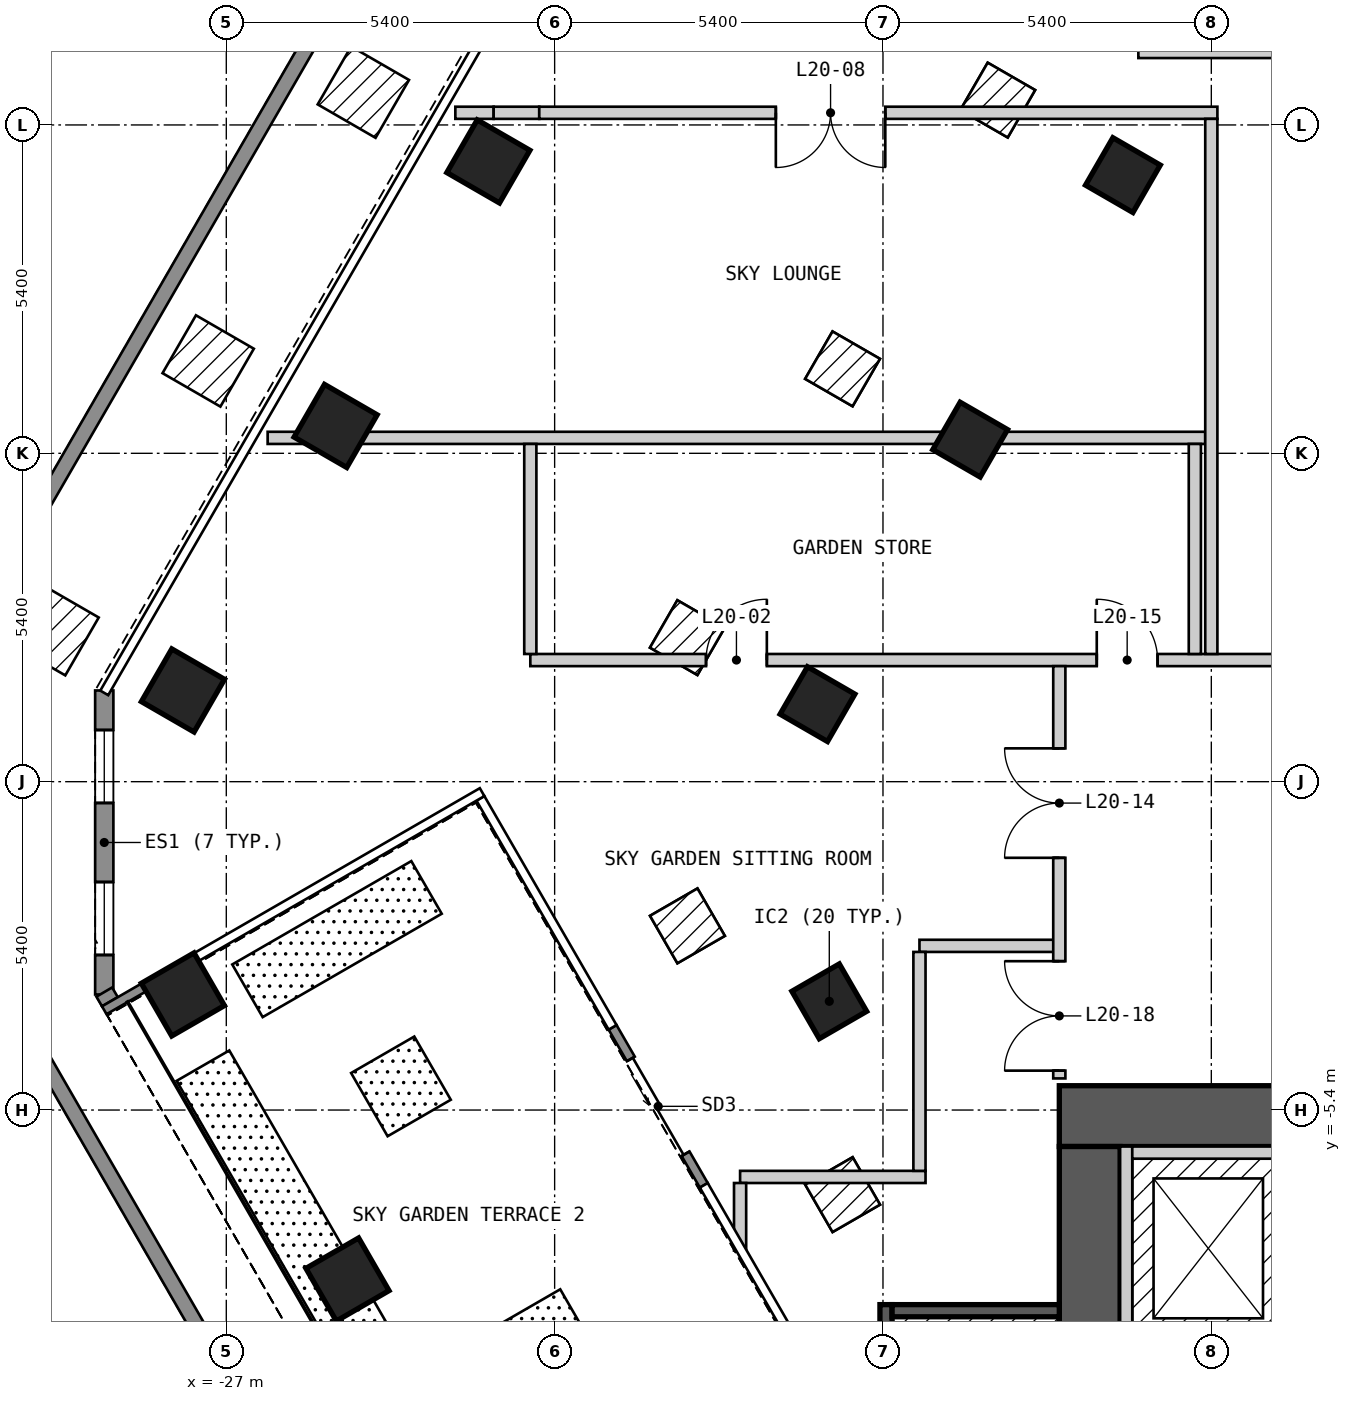
"""IFC4 building model, lengths in metres.
Left out: names, types, materials, properties, quantities, classifications, styles, units other than length and angle.
Written with IfcOpenShell. Run it as: python <this file> out.ifc"""

import sys

from ifc_helpers import new_model, si_unit, direction, frame, frame_2d, origin, origin_2d, place, context, subcontext, project, spatial, polyline, rectangle, outline, extrude, element, fill, save


model = new_model("IFC4")
c1 = context("Model", 3, precision=1e-05, world=origin(), true_north=direction((0.0, 1.0)))
c2 = subcontext(c1, "Body", "Model", "MODEL_VIEW")
j1 = project(units=[si_unit("LENGTHUNIT", "METRE"), si_unit("PLANEANGLEUNIT", "RADIAN")], contexts=[c1])
p1 = place(None, origin())
s1 = spatial("IfcSite", under=j1, at=p1, CompositionType="ELEMENT")
p2 = place(p1, origin())
s2 = spatial("IfcBuilding", under=s1, at=p2, CompositionType="ELEMENT")
p3 = place(p2, frame((0.0, 0.0, 66.0)))
s3 = spatial("IfcBuildingStorey", under=s2, at=p3, CompositionType="ELEMENT", Elevation=66.0)
for number, where, z_axis, x_axis in (
    (1, (-22.69, 10.2, 0.0), (0.0, 0.0, 1.0), (-0.5, -0.866, 0.0)),
    (2, (-25.202, 5.85, 0.0), (0.0, 0.0, 1.0), (-0.5, -0.866, 0.0)),
    (3, (-27.713, 1.5, 0.0), (0.0, 0.0, 1.0), (-0.5, -0.866, 0.0)),
    (4, (-27.714, -3.499, 0.0), (0.0, 0.0, 1.0), (0.5, -0.866, 0.0)),
    (5, (-25.007, -8.187, 0.0), (0.0, 0.0, 1.0), (0.5, -0.866, 0.0)),
):
    element("IfcColumn", number, at=place(p3, frame(where, z_axis=z_axis, x_axis=x_axis)), inside=s3, PredefinedType="COLUMN", context=c2, shape_type="SweptSolid", body=[
        extrude(rectangle(XDim=1.0, YDim=1.0, at=origin_2d()), origin(), (0.0, 0.0, 1.0), 6.0),
    ])
for number, where, z_axis, x_axis in (
    (6, (-17.083, -3.612, 0.0), (0.0, 0.0, 1.0), (0.5, -0.866, 0.0)),
    (7, (-12.254, 9.975, 0.0), (0.0, 0.0, 1.0), (-0.5, -0.866, 0.0)),
    (8, (-14.766, 5.625, 0.0), (0.0, 0.0, 1.0), (-0.5, -0.866, 0.0)),
    (9, (-17.277, 1.275, 0.0), (0.0, 0.0, 1.0), (-0.5, -0.866, 0.0)),
):
    element("IfcColumn", number, at=place(p3, frame(where, z_axis=z_axis, x_axis=x_axis)), inside=s3, PredefinedType="COLUMN", context=c2, shape_type="SweptSolid", body=[
        extrude(rectangle(XDim=0.9, YDim=0.9, at=origin_2d()), origin(), (0.0, 0.0, 1.0), 6.0),
    ])
p4 = place(p3, frame((-13.3, -5.5, 0.0), z_axis=(0.0, 0.0, 1.0), x_axis=(1.0, 0.0, 0.0)))
e10 = element("IfcWall", 10, at=p4, inside=s3, PredefinedType="SHEAR", context=c2, shape_type="SweptSolid", body=[
    extrude(rectangle(XDim=26.6, YDim=1.0, at=frame_2d((13.3, 0.0))), origin(), (0.0, 0.0, 1.0), 5.7),
])
p5 = place(p4, frame((23.65, 0.0, 0.0)))
e11 = element("IfcOpeningElement", 11, at=p5, cuts=e10, PredefinedType="OPENING", context=c2, shape_type="SweptSolid", body=[
    extrude(rectangle(XDim=1.2, YDim=2.1, at=frame_2d((0.6, 1.05))), frame((0.0, 0.51, 0.0), z_axis=(0.0, -1.0, 0.0), x_axis=(1.0, 0.0, 0.0)), (0.0, 0.0, 1.0), 1.02),
])
p6 = place(p3, frame((-12.8, -18.0, 0.0), z_axis=(0.0, 0.0, 1.0), x_axis=(0.0, 1.0, 0.0)))
e12 = element("IfcWall", 12, at=p6, inside=s3, PredefinedType="SHEAR", context=c2, shape_type="SweptSolid", body=[
    extrude(rectangle(XDim=12.0, YDim=1.0, at=frame_2d((6.0, 0.0))), origin(), (0.0, 0.0, 1.0), 5.7),
])
p7 = place(p6, frame((3.8, 0.0, 0.0)))
e13 = element("IfcOpeningElement", 13, at=p7, cuts=e12, PredefinedType="OPENING", context=c2, shape_type="SweptSolid", body=[
    extrude(rectangle(XDim=1.2, YDim=2.1, at=frame_2d((0.6, 1.05))), frame((0.0, 0.51, 0.0), z_axis=(0.0, -1.0, 0.0), x_axis=(1.0, 0.0, 0.0)), (0.0, 0.0, 1.0), 1.02),
])
p8 = place(p3, frame((-29.007, 1.5, 0.0), z_axis=(0.0, 0.0, 1.0), x_axis=(0.0, -1.0, 0.0)))
e14 = element("IfcWall", 14, at=p8, inside=s3, PredefinedType="SOLIDWALL", context=c2, shape_type="SweptSolid", body=[
    extrude(outline(polyline([(0.0, -0.15), (5.0, -0.15), (4.92, 0.15), (0.08, 0.15), (0.0, -0.15)])), origin(), (0.0, 0.0, 1.0), 5.7),
])
p9 = place(p8, frame((0.65, 0.0, 0.15)))
e15 = element("IfcOpeningElement", 15, at=p9, cuts=e14, PredefinedType="OPENING", context=c2, shape_type="SweptSolid", body=[
    extrude(rectangle(XDim=1.2, YDim=2.1, at=frame_2d((0.6, 1.05))), frame((0.0, 0.16, 0.0), z_axis=(0.0, -1.0, 0.0), x_axis=(1.0, 0.0, 0.0)), (0.0, 0.0, 1.0), 0.32),
])
p10 = place(p8, frame((3.15, 0.0, 0.15)))
e16 = element("IfcOpeningElement", 16, at=p10, cuts=e14, PredefinedType="OPENING", context=c2, shape_type="SweptSolid", body=[
    extrude(rectangle(XDim=1.2, YDim=2.1, at=frame_2d((0.6, 1.05))), frame((0.0, 0.16, 0.0), z_axis=(0.0, -1.0, 0.0), x_axis=(1.0, 0.0, 0.0)), (0.0, 0.0, 1.0), 0.32),
])
p11 = place(p3, frame((-29.007, -3.46, 0.0), z_axis=(0.0, 0.0, 1.0), x_axis=(0.505106950785, -0.863056758428, 0.0)))
e17 = element("IfcWall", 17, at=p11, inside=s3, PredefinedType="SOLIDWALL", context=c2, shape_type="SweptSolid", body=[
    extrude(rectangle(XDim=0.184, YDim=0.3, at=frame_2d((0.092, 0.0))), origin(), (0.0, 0.0, 1.0), 5.7),
])
p12 = place(p3, frame((-20.647, -4.04, 0.0), z_axis=(0.0, 0.0, 1.0), x_axis=(0.50002537861, -0.866010750942, 0.0)))
e18 = element("IfcWall", 18, at=p12, inside=s3, PredefinedType="SOLIDWALL", context=c2, shape_type="SweptSolid", body=[
    extrude(rectangle(XDim=3.0, YDim=0.15, at=frame_2d((1.5, 0.0))), origin(), (0.0, 0.0, 1.0), 5.7),
])
p13 = place(p12, frame((0.6, 0.0, 0.0)))
e19 = element("IfcOpeningElement", 19, at=p13, cuts=e18, PredefinedType="OPENING", context=c2, shape_type="SweptSolid", body=[
    extrude(rectangle(XDim=1.8, YDim=2.4, at=frame_2d((0.9, 1.2))), frame((0.0, 0.085, 0.0), z_axis=(0.0, -1.0, 0.0), x_axis=(1.0, 0.0, 0.0)), (0.0, 0.0, 1.0), 0.17),
])
p14 = place(p3, frame((-29.007, -3.759, 0.0), z_axis=(0.0, 0.0, 1.0), x_axis=(0.866218334262, 0.499665685623, 0.0)))
e20 = element("IfcWall", 20, at=p14, inside=s3, PredefinedType="SOLIDWALL", context=c2, shape_type="SweptSolid", body=[
    extrude(rectangle(XDim=0.745, YDim=0.15, at=frame_2d((0.372, 0.0))), origin(), (0.0, 0.0, 1.0), 5.7),
])
for number, where, z_axis, x_axis in (
    (21, (-17.731, -25.837, 0.0), (0.0, 0.0, 1.0), (-0.5, 0.866, 0.0)),
    (22, (-31.242, 2.438, 0.0), (0.0, 0.0, 1.0), (0.5, 0.866, 0.0)),
):
    element("IfcWall", number, at=place(p3, frame(where, z_axis=z_axis, x_axis=x_axis)), inside=s3, PredefinedType="PARAPET", context=c2, shape_type="SweptSolid", body=[
        extrude(outline(polyline([(0.067, -0.125), (26.953, -0.125), (27.02, 0.125), (0.0, 0.125), (0.067, -0.125)])), origin(), (0.0, 0.0, 1.0), 1.6),
    ])
p15 = place(p3, frame((-18.55, -6.5, 0.0), z_axis=(0.0, 0.0, 1.0), x_axis=(1.0, 0.0, 0.0)))
e23 = element("IfcWall", 23, at=p15, inside=s3, PredefinedType="PARTITIONING", context=c2, shape_type="SweptSolid", body=[
    extrude(rectangle(XDim=3.05, YDim=0.2, at=frame_2d((1.525, 0.0))), origin(), (0.0, 0.0, 1.0), 5.7),
])
p16 = place(p3, frame((-15.6, -2.7, 0.0), z_axis=(0.0, 0.0, 1.0), x_axis=(1.0, 0.0, 0.0)))
e24 = element("IfcWall", 24, at=p16, inside=s3, PredefinedType="PARTITIONING", context=c2, shape_type="SweptSolid", body=[
    extrude(rectangle(XDim=2.3, YDim=0.2, at=frame_2d((1.15, 0.0))), origin(), (0.0, 0.0, 1.0), 5.7),
])
p17 = place(p3, frame((-22.0, 2.0, 0.0), z_axis=(0.0, 0.0, 1.0), x_axis=(1.0, 0.0, 0.0)))
e25 = element("IfcWall", 25, at=p17, inside=s3, PredefinedType="PARTITIONING", context=c2, shape_type="SweptSolid", body=[
    extrude(rectangle(XDim=35.4, YDim=0.2, at=frame_2d((17.7, 0.0))), origin(), (0.0, 0.0, 1.0), 5.7),
])
p18 = place(p17, frame((3.89, 0.0, 0.0), z_axis=(0.0, 0.0, 1.0), x_axis=(-1.0, 0.0, 0.0)))
e26 = element("IfcOpeningElement", 26, at=p18, cuts=e25, PredefinedType="OPENING", context=c2, shape_type="SweptSolid", body=[
    extrude(rectangle(XDim=1.0, YDim=2.1, at=frame_2d((0.5, 1.05))), frame((0.0, 0.11, 0.0), z_axis=(0.0, -1.0, 0.0), x_axis=(1.0, 0.0, 0.0)), (0.0, 0.0, 1.0), 0.22),
])
p19 = place(p17, frame((21.1, 0.0, 0.0)))
e27 = element("IfcOpeningElement", 27, at=p19, cuts=e25, PredefinedType="OPENING", context=c2, shape_type="SweptSolid", body=[
    extrude(rectangle(XDim=1.8, YDim=2.1, at=frame_2d((0.9, 1.05))), frame((0.0, 0.11, 0.0), z_axis=(0.0, -1.0, 0.0), x_axis=(1.0, 0.0, 0.0)), (0.0, 0.0, 1.0), 0.22),
])
p20 = place(p17, frame((9.316, 0.0, 0.0)))
e28 = element("IfcOpeningElement", 28, at=p20, cuts=e25, PredefinedType="OPENING", context=c2, shape_type="SweptSolid", body=[
    extrude(rectangle(XDim=1.0, YDim=2.1, at=frame_2d((0.5, 1.05))), frame((0.0, 0.11, 0.0), z_axis=(0.0, -1.0, 0.0), x_axis=(1.0, 0.0, 0.0)), (0.0, 0.0, 1.0), 0.22),
])
p21 = place(p17, frame((13.102, 0.0, 0.0)))
e29 = element("IfcOpeningElement", 29, at=p21, cuts=e25, PredefinedType="OPENING", context=c2, shape_type="SweptSolid", body=[
    extrude(rectangle(XDim=1.8, YDim=2.1, at=frame_2d((0.9, 1.05))), frame((0.0, 0.11, 0.0), z_axis=(0.0, -1.0, 0.0), x_axis=(1.0, 0.0, 0.0)), (0.0, 0.0, 1.0), 0.22),
])
p22 = place(p3, frame((-26.32, 5.654, 0.0), z_axis=(0.0, 0.0, 1.0), x_axis=(1.0, 0.0, 0.0)))
e30 = element("IfcWall", 30, at=p22, inside=s3, PredefinedType="PARTITIONING", context=c2, shape_type="SweptSolid", body=[
    extrude(rectangle(XDim=0.63, YDim=0.2, at=frame_2d((0.315, 0.0))), origin(), (0.0, 0.0, 1.0), 5.7),
])
p23 = place(p3, frame((-25.69, 5.654, 0.0), z_axis=(0.0, 0.0, 1.0), x_axis=(1.0, 0.0, 0.0)))
e31 = element("IfcWall", 31, at=p23, inside=s3, PredefinedType="PARTITIONING", context=c2, shape_type="SweptSolid", body=[
    extrude(rectangle(XDim=0.726, YDim=0.2, at=frame_2d((0.363, 0.0))), origin(), (0.0, 0.0, 1.0), 5.02),
])
p24 = place(p3, frame((-24.964, 5.654, 0.0), z_axis=(0.0, 0.0, 1.0), x_axis=(1.0, 0.0, 0.0)))
e32 = element("IfcWall", 32, at=p24, inside=s3, PredefinedType="PARTITIONING", context=c2, shape_type="SweptSolid", body=[
    extrude(rectangle(XDim=14.064, YDim=0.2, at=frame_2d((7.032, 0.0))), origin(), (0.0, 0.0, 1.0), 5.7),
])
p25 = place(p3, frame((-23.233, 11.0, 0.0), z_axis=(0.0, 0.0, 1.0), x_axis=(1.0, 0.0, 0.0)))
e33 = element("IfcWall", 33, at=p25, inside=s3, PredefinedType="PARTITIONING", context=c2, shape_type="SweptSolid", body=[
    extrude(rectangle(XDim=0.63, YDim=0.2, at=frame_2d((0.315, 0.0))), origin(), (0.0, 0.0, 1.0), 5.7),
])
p26 = place(p3, frame((-22.603, 11.0, 0.0), z_axis=(0.0, 0.0, 1.0), x_axis=(1.0, 0.0, 0.0)))
e34 = element("IfcWall", 34, at=p26, inside=s3, PredefinedType="PARTITIONING", context=c2, shape_type="SweptSolid", body=[
    extrude(rectangle(XDim=0.75, YDim=0.2, at=frame_2d((0.375, 0.0))), origin(), (0.0, 0.0, 1.0), 5.02),
])
p27 = place(p3, frame((-21.853, 11.0, 0.0), z_axis=(0.0, 0.0, 1.0), x_axis=(1.0, 0.0, 0.0)))
e35 = element("IfcWall", 35, at=p27, inside=s3, PredefinedType="PARTITIONING", context=c2, shape_type="SweptSolid", body=[
    extrude(rectangle(XDim=11.153, YDim=0.2, at=frame_2d((5.577, 0.0))), origin(), (0.0, 0.0, 1.0), 5.7),
])
p28 = place(p27, frame((5.691, 0.0, 0.0), z_axis=(0.0, 0.0, 1.0), x_axis=(-1.0, 0.0, 0.0)))
e36 = element("IfcOpeningElement", 36, at=p28, cuts=e35, PredefinedType="OPENING", context=c2, shape_type="SweptSolid", body=[
    extrude(rectangle(XDim=1.8, YDim=2.1, at=frame_2d((0.9, 1.05))), frame((0.0, 0.11, 0.0), z_axis=(0.0, -1.0, 0.0), x_axis=(1.0, 0.0, 0.0)), (0.0, 0.0, 1.0), 0.22),
])
p29 = place(p3, frame((-12.0, 12.0, 0.0), z_axis=(0.0, 0.0, 1.0), x_axis=(1.0, 0.0, 0.0)))
e37 = element("IfcWall", 37, at=p29, inside=s3, PredefinedType="PARTITIONING", context=c2, shape_type="SweptSolid", body=[
    extrude(rectangle(XDim=5.454, YDim=0.2, at=frame_2d((2.727, 0.0))), origin(), (0.0, 0.0, 1.0), 5.7),
])
p30 = place(p3, frame((-22.0, 2.1, 0.0), z_axis=(0.0, 0.0, 1.0), x_axis=(0.0, 1.0, 0.0)))
e38 = element("IfcWall", 38, at=p30, inside=s3, PredefinedType="PARTITIONING", context=c2, shape_type="SweptSolid", body=[
    extrude(rectangle(XDim=3.454, YDim=0.2, at=frame_2d((1.727, 0.0))), origin(), (0.0, 0.0, 1.0), 5.7),
])
p31 = place(p3, frame((-18.55, -7.711, 0.0), z_axis=(0.0, 0.0, 1.0), x_axis=(0.0, 1.0, 0.0)))
e39 = element("IfcWall", 39, at=p31, inside=s3, PredefinedType="PARTITIONING", context=c2, shape_type="SweptSolid", body=[
    extrude(rectangle(XDim=1.111, YDim=0.2, at=frame_2d((0.555, 0.0))), origin(), (0.0, 0.0, 1.0), 5.7),
])
p32 = place(p3, frame((-15.6, -6.4, 0.0), z_axis=(0.0, 0.0, 1.0), x_axis=(0.0, 1.0, 0.0)))
e40 = element("IfcWall", 40, at=p32, inside=s3, PredefinedType="PARTITIONING", context=c2, shape_type="SweptSolid", body=[
    extrude(rectangle(XDim=3.6, YDim=0.2, at=frame_2d((1.8, 0.0))), origin(), (0.0, 0.0, 1.0), 5.7),
])
p33 = place(p3, frame((-13.3, -4.88, 0.0), z_axis=(0.0, 0.0, 1.0), x_axis=(0.0, 1.0, 0.0)))
e41 = element("IfcWall", 41, at=p33, inside=s3, PredefinedType="PARTITIONING", context=c2, shape_type="SweptSolid", body=[
    extrude(rectangle(XDim=6.78, YDim=0.2, at=frame_2d((3.39, 0.0))), origin(), (0.0, 0.0, 1.0), 5.7),
])
p34 = place(p33, frame((3.628, 0.0, 0.0)))
e42 = element("IfcOpeningElement", 42, at=p34, cuts=e41, PredefinedType="OPENING", context=c2, shape_type="SweptSolid", body=[
    extrude(rectangle(XDim=1.8, YDim=2.1, at=frame_2d((0.9, 1.05))), frame((0.0, 0.11, 0.0), z_axis=(0.0, -1.0, 0.0), x_axis=(1.0, 0.0, 0.0)), (0.0, 0.0, 1.0), 0.22),
])
p35 = place(p33, frame((0.128, 0.0, 0.0)))
e43 = element("IfcOpeningElement", 43, at=p35, cuts=e41, PredefinedType="OPENING", context=c2, shape_type="SweptSolid", body=[
    extrude(rectangle(XDim=1.8, YDim=2.1, at=frame_2d((0.9, 1.05))), frame((0.0, 0.11, 0.0), z_axis=(0.0, -1.0, 0.0), x_axis=(1.0, 0.0, 0.0)), (0.0, 0.0, 1.0), 0.22),
])
p36 = place(p3, frame((-11.071, 2.1, 0.0), z_axis=(0.0, 0.0, 1.0), x_axis=(0.0, 1.0, 0.0)))
e44 = element("IfcWall", 44, at=p36, inside=s3, PredefinedType="PARTITIONING", context=c2, shape_type="SweptSolid", body=[
    extrude(rectangle(XDim=3.454, YDim=0.2, at=frame_2d((1.727, 0.0))), origin(), (0.0, 0.0, 1.0), 5.7),
])
p37 = place(p3, frame((-10.8, 2.1, 0.0), z_axis=(0.0, 0.0, 1.0), x_axis=(0.0, 1.0, 0.0)))
e45 = element("IfcWall", 45, at=p37, inside=s3, PredefinedType="PARTITIONING", context=c2, shape_type="SweptSolid", body=[
    extrude(rectangle(XDim=8.8, YDim=0.2, at=frame_2d((4.4, 0.0))), origin(), (0.0, 0.0, 1.0), 5.7),
])
p38 = place(p3, frame((-16.15, -14.4, 0.0), z_axis=(0.0, 0.0, 1.0), x_axis=(0.0, 1.0, 0.0)))
e46 = element("IfcWall", 46, at=p38, inside=s3, PredefinedType="SOLIDWALL", context=c2, shape_type="SweptSolid", body=[
    extrude(rectangle(XDim=5.8, YDim=0.2, at=frame_2d((2.9, 0.0))), origin(), (0.0, 0.0, 1.0), 5.7),
])
p39 = place(p3, frame((-16.05, -8.7, 0.0), z_axis=(0.0, 0.0, 1.0), x_axis=(1.0, 0.0, 0.0)))
e47 = element("IfcWall", 47, at=p39, inside=s3, PredefinedType="SOLIDWALL", context=c2, shape_type="SweptSolid", body=[
    extrude(rectangle(XDim=2.75, YDim=0.2, at=frame_2d((1.375, 0.0))), origin(), (0.0, 0.0, 1.0), 5.7),
])
p40 = place(p3, frame((-12.2, -9.15, 0.0), z_axis=(0.0, 0.0, 1.0), x_axis=(0.0, 1.0, 0.0)))
e48 = element("IfcWall", 48, at=p40, inside=s3, PredefinedType="SOLIDWALL", context=c2, shape_type="SweptSolid", body=[
    extrude(rectangle(XDim=3.15, YDim=0.2, at=frame_2d((1.575, 0.0))), origin(), (0.0, 0.0, 1.0), 5.7),
])
p41 = place(p3, frame((-12.1, -6.1, 0.0), z_axis=(0.0, 0.0, 1.0), x_axis=(1.0, 0.0, 0.0)))
e49 = element("IfcWall", 49, at=p41, inside=s3, PredefinedType="SOLIDWALL", context=c2, shape_type="SweptSolid", body=[
    extrude(rectangle(XDim=5.4, YDim=0.2, at=frame_2d((2.7, 0.0))), origin(), (0.0, 0.0, 1.0), 5.7),
])
p42 = place(p9, origin())
e50 = element("IfcWindow", 50, at=p42, inside=s3, PartitioningType="SINGLE_PANEL", PredefinedType="WINDOW", context=c2, shape_type="SweptSolid", body=[
    extrude(rectangle(XDim=1.2, YDim=2.1, at=frame_2d((0.6, 1.05))), frame((0.0, 0.03, 0.0), z_axis=(0.0, -1.0, 0.0), x_axis=(1.0, 0.0, 0.0)), (0.0, 0.0, 1.0), 0.06),
])
fill(e15, e50)
p43 = place(p10, origin())
e51 = element("IfcWindow", 51, at=p43, inside=s3, PartitioningType="SINGLE_PANEL", PredefinedType="WINDOW", context=c2, shape_type="SweptSolid", body=[
    extrude(rectangle(XDim=1.2, YDim=2.1, at=frame_2d((0.6, 1.05))), frame((0.0, 0.03, 0.0), z_axis=(0.0, -1.0, 0.0), x_axis=(1.0, 0.0, 0.0)), (0.0, 0.0, 1.0), 0.06),
])
fill(e16, e51)
p44 = place(p13, origin())
e52 = element("IfcDoor", 52, at=p44, inside=s3, OperationType="SLIDING_TO_LEFT", PredefinedType="DOOR", context=c2, shape_type="SweptSolid", body=[
    extrude(rectangle(XDim=1.8, YDim=2.4, at=frame_2d((0.9, 1.2))), frame((0.0, 0.025, 0.0), z_axis=(0.0, -1.0, 0.0), x_axis=(1.0, 0.0, 0.0)), (0.0, 0.0, 1.0), 0.05),
])
fill(e19, e52)
p45 = place(p18, origin())
e53 = element("IfcDoor", 53, at=p45, inside=s3, OperationType="SINGLE_SWING_LEFT", PredefinedType="DOOR", context=c2, shape_type="SweptSolid", body=[
    extrude(rectangle(XDim=1.0, YDim=2.1, at=frame_2d((0.5, 1.05))), frame((0.0, 0.025, 0.0), z_axis=(0.0, -1.0, 0.0), x_axis=(1.0, 0.0, 0.0)), (0.0, 0.0, 1.0), 0.05),
])
fill(e26, e53)
p46 = place(p28, origin())
e54 = element("IfcDoor", 54, at=p46, inside=s3, OperationType="DOUBLE_DOOR_SINGLE_SWING", PredefinedType="DOOR", context=c2, shape_type="SweptSolid", body=[
    extrude(rectangle(XDim=1.8, YDim=2.1, at=frame_2d((0.9, 1.05))), frame((0.0, 0.025, 0.0), z_axis=(0.0, -1.0, 0.0), x_axis=(1.0, 0.0, 0.0)), (0.0, 0.0, 1.0), 0.05),
])
fill(e36, e54)
p47 = place(p34, origin())
e55 = element("IfcDoor", 55, at=p47, inside=s3, OperationType="DOUBLE_DOOR_SINGLE_SWING", PredefinedType="DOOR", context=c2, shape_type="SweptSolid", body=[
    extrude(rectangle(XDim=1.8, YDim=2.1, at=frame_2d((0.9, 1.05))), frame((0.0, 0.025, 0.0), z_axis=(0.0, -1.0, 0.0), x_axis=(1.0, 0.0, 0.0)), (0.0, 0.0, 1.0), 0.05),
])
fill(e42, e55)
p48 = place(p20, origin())
e56 = element("IfcDoor", 56, at=p48, inside=s3, OperationType="SINGLE_SWING_LEFT", PredefinedType="DOOR", context=c2, shape_type="SweptSolid", body=[
    extrude(rectangle(XDim=1.0, YDim=2.1, at=frame_2d((0.5, 1.05))), frame((0.0, 0.025, 0.0), z_axis=(0.0, -1.0, 0.0), x_axis=(1.0, 0.0, 0.0)), (0.0, 0.0, 1.0), 0.05),
])
fill(e28, e56)
p49 = place(p35, origin())
e57 = element("IfcDoor", 57, at=p49, inside=s3, OperationType="DOUBLE_DOOR_SINGLE_SWING", PredefinedType="DOOR", context=c2, shape_type="SweptSolid", body=[
    extrude(rectangle(XDim=1.8, YDim=2.1, at=frame_2d((0.9, 1.05))), frame((0.0, 0.025, 0.0), z_axis=(0.0, -1.0, 0.0), x_axis=(1.0, 0.0, 0.0)), (0.0, 0.0, 1.0), 0.05),
])
fill(e43, e57)
save(model, sys.argv[1])
